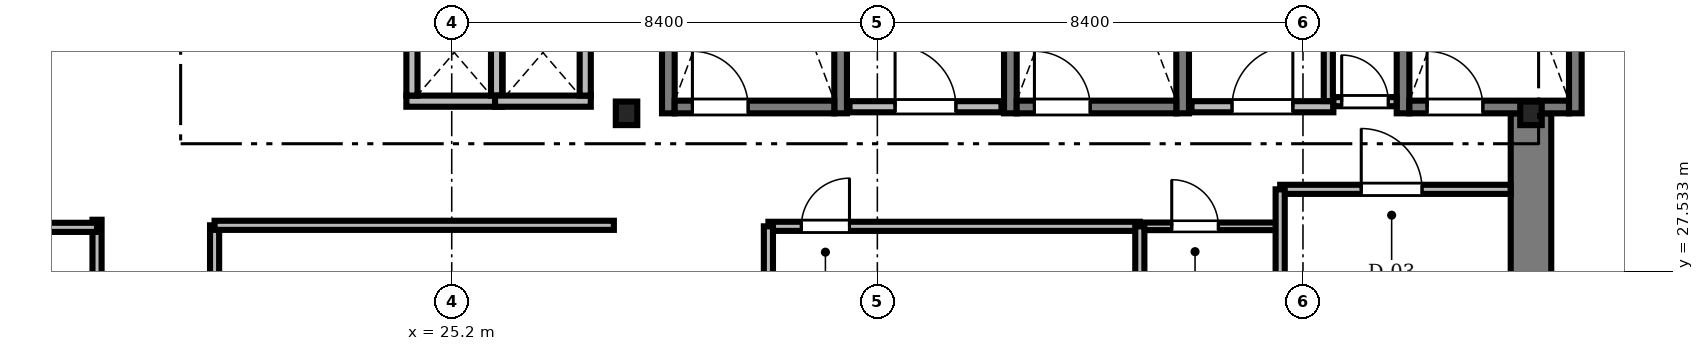
"""IFC4 building model, lengths in metres.
Left out: names, types, materials, properties, quantities, classifications, styles, units other than length and angle.
Written with IfcOpenShell. Run it as: python <this file> out.ifc"""

import sys

from ifc_helpers import new_model, si_unit, direction, frame, frame_2d, origin, origin_2d, place, context, subcontext, project, spatial, rectangle, i_section, extrude, source, transform, mapped, element, fill, save


model = new_model("IFC4")
c1 = context("Model", 3, precision=1e-05, world=origin(), true_north=direction((0.0, 1.0)))
c2 = subcontext(c1, "Body", "Model", "MODEL_VIEW")
j1 = project(units=[si_unit("LENGTHUNIT", "METRE"), si_unit("PLANEANGLEUNIT", "RADIAN")], contexts=[c1])
p1 = place(None, origin())
s1 = spatial("IfcSite", under=j1, at=p1, CompositionType="ELEMENT")
p2 = place(p1, origin())
s2 = spatial("IfcBuilding", under=s1, at=p2, CompositionType="ELEMENT")
p3 = place(p2, frame((0.0, 0.0, 107.5)))
s3 = spatial("IfcBuildingStorey", under=s2, at=p3, CompositionType="ELEMENT", Elevation=107.5)
m1 = source(origin(), c2, "Body", "SweptSolid", [
    extrude(rectangle(XDim=13.15, YDim=0.8, at=frame_2d((6.575, 0.0))), origin(), (0.0, 0.0, 1.0), 3.56),
])
p4 = place(p3, frame((46.5, 17.5, 0.0), z_axis=(0.0, 0.0, 1.0), x_axis=(0.0, 1.0, 0.0)))
e1 = element("IfcWall", 1, at=p4, inside=s3, PredefinedType="SHEAR", context=c2, shape_type="MappedRepresentation", body=[
    mapped(m1, transform((0.0, 0.0, 0.0), scale=1.0)),
])
m2 = source(origin(), c2, "Body", "SweptSolid", [
    extrude(i_section(OverallWidth=0.424, OverallDepth=0.465, WebThickness=0.035, FlangeThickness=0.056, FilletRadius=0.015, at=origin_2d()), origin(), (0.0, 0.0, 1.0), 3.56),
])
for number, where, z_axis, x_axis in (
    (2, (28.65, 30.65, 0.0), (0.0, 0.0, 1.0), (1.0, 0.0, 0.0)),
    (3, (46.5, 30.65, 0.0), (0.0, 0.0, 1.0), (1.0, 0.0, 0.0)),
):
    element("IfcColumn", number, at=place(p3, frame(where, z_axis=z_axis, x_axis=x_axis)), inside=s3, PredefinedType="COLUMN", context=c2, shape_type="MappedRepresentation", body=[
        mapped(m2, transform((0.0, 0.0, 0.0), scale=1.0)),
    ])
m3 = source(origin(), c2, "Body", "SweptSolid", [
    extrude(rectangle(XDim=9.25, YDim=0.25, at=frame_2d((4.625, 0.0))), origin(), (0.0, 0.0, 1.0), 3.6),
])
for number, where, z_axis, x_axis in (
    (4, (29.475, 30.65, 0.0), (0.0, 0.0, 1.0), (0.0, 1.0, 0.0)),
    (5, (32.875, 30.65, 0.0), (0.0, 0.0, 1.0), (0.0, 1.0, 0.0)),
):
    element("IfcWall", number, at=place(p3, frame(where, z_axis=z_axis, x_axis=x_axis)), inside=s3, PredefinedType="SOLIDWALL", context=c2, shape_type="MappedRepresentation", body=[
        mapped(m3, transform((0.0, 0.0, 0.0), scale=1.0)),
    ])
m4 = source(origin(), c2, "Body", "SweptSolid", [
    extrude(rectangle(XDim=3.15, YDim=0.25, at=frame_2d((1.575, 0.0))), origin(), (0.0, 0.0, 1.0), 3.6),
])
p5 = place(p3, frame((29.6, 30.775, 0.0), z_axis=(0.0, 0.0, 1.0), x_axis=(1.0, 0.0, 0.0)))
e6 = element("IfcWall", 6, at=p5, inside=s3, PredefinedType="SOLIDWALL", context=c2, shape_type="MappedRepresentation", body=[
    mapped(m4, transform((0.0, 0.0, 0.0), scale=1.0)),
])
m5 = source(origin(), c2, "Body", "SweptSolid", [
    extrude(rectangle(XDim=1.1, YDim=2.2, at=frame_2d((0.55, 1.1))), frame((0.0, 0.135, 0.0), z_axis=(0.0, -1.0, 0.0), x_axis=(1.0, 0.0, 0.0)), (0.0, 0.0, 1.0), 0.27),
])
p6 = place(p5, frame((0.35, 0.0, 0.0)))
e7 = element("IfcOpeningElement", 7, at=p6, cuts=e6, PredefinedType="OPENING", context=c2, shape_type="MappedRepresentation", body=[
    mapped(m5, transform((0.0, 0.0, 0.0), scale=1.0)),
])
for number, where, z_axis, x_axis in (
    (8, (36.225, 30.65, 0.0), (0.0, 0.0, 1.0), (0.0, 1.0, 0.0)),
    (9, (39.625, 30.65, 0.0), (0.0, 0.0, 1.0), (0.0, 1.0, 0.0)),
):
    element("IfcWall", number, at=place(p3, frame(where, z_axis=z_axis, x_axis=x_axis)), inside=s3, PredefinedType="SOLIDWALL", context=c2, shape_type="MappedRepresentation", body=[
        mapped(m3, transform((0.0, 0.0, 0.0), scale=1.0)),
    ])
p7 = place(p3, frame((36.35, 30.775, 0.0), z_axis=(0.0, 0.0, 1.0), x_axis=(1.0, 0.0, 0.0)))
e10 = element("IfcWall", 10, at=p7, inside=s3, PredefinedType="SOLIDWALL", context=c2, shape_type="MappedRepresentation", body=[
    mapped(m4, transform((0.0, 0.0, 0.0), scale=1.0)),
])
p8 = place(p7, frame((0.35, 0.0, 0.0)))
e11 = element("IfcOpeningElement", 11, at=p8, cuts=e10, PredefinedType="OPENING", context=c2, shape_type="MappedRepresentation", body=[
    mapped(m5, transform((0.0, 0.0, 0.0), scale=1.0)),
])
for number, where, z_axis, x_axis in (
    (12, (43.975, 30.65, 0.0), (0.0, 0.0, 1.0), (0.0, 1.0, 0.0)),
    (13, (47.375, 30.65, 0.0), (0.0, 0.0, 1.0), (0.0, 1.0, 0.0)),
):
    element("IfcWall", number, at=place(p3, frame(where, z_axis=z_axis, x_axis=x_axis)), inside=s3, PredefinedType="SOLIDWALL", context=c2, shape_type="MappedRepresentation", body=[
        mapped(m3, transform((0.0, 0.0, 0.0), scale=1.0)),
    ])
p9 = place(p3, frame((44.1, 30.775, 0.0), z_axis=(0.0, 0.0, 1.0), x_axis=(1.0, 0.0, 0.0)))
e14 = element("IfcWall", 14, at=p9, inside=s3, PredefinedType="SOLIDWALL", context=c2, shape_type="MappedRepresentation", body=[
    mapped(m4, transform((0.0, 0.0, 0.0), scale=1.0)),
])
p10 = place(p9, frame((0.35, 0.0, 0.0)))
e15 = element("IfcOpeningElement", 15, at=p10, cuts=e14, PredefinedType="OPENING", context=c2, shape_type="MappedRepresentation", body=[
    mapped(m5, transform((0.0, 0.0, 0.0), scale=1.0)),
])
m6 = source(origin(), c2, "Body", "SweptSolid", [
    extrude(rectangle(XDim=3.0, YDim=0.22, at=frame_2d((1.5, 0.0))), origin(), (0.0, 0.0, 1.0), 3.56),
])
p11 = place(p3, frame((33.05, 30.78, 0.0), z_axis=(0.0, 0.0, 1.0), x_axis=(1.0, 0.0, 0.0)))
e16 = element("IfcWall", 16, at=p11, inside=s3, PredefinedType="SOLIDWALL", context=c2, shape_type="MappedRepresentation", body=[
    mapped(m6, transform((0.0, 0.0, 0.0), scale=1.0)),
])
m7 = source(origin(), c2, "Body", "SweptSolid", [
    extrude(rectangle(XDim=1.2, YDim=2.2, at=frame_2d((0.6, 1.1))), frame((0.0, 0.12, 0.0), z_axis=(0.0, -1.0, 0.0), x_axis=(1.0, 0.0, 0.0)), (0.0, 0.0, 1.0), 0.24),
])
p12 = place(p11, frame((0.9, 0.0, 0.0)))
e17 = element("IfcOpeningElement", 17, at=p12, cuts=e16, PredefinedType="OPENING", context=c2, shape_type="MappedRepresentation", body=[
    mapped(m7, transform((0.0, 0.0, 0.0), scale=1.0)),
])
m8 = source(origin(), c2, "Body", "SweptSolid", [
    extrude(rectangle(XDim=2.8, YDim=0.22, at=frame_2d((1.4, 0.0))), origin(), (0.0, 0.0, 1.0), 3.56),
])
p13 = place(p3, frame((39.8, 30.78, 0.0), z_axis=(0.0, 0.0, 1.0), x_axis=(1.0, 0.0, 0.0)))
e18 = element("IfcWall", 18, at=p13, inside=s3, PredefinedType="SOLIDWALL", context=c2, shape_type="MappedRepresentation", body=[
    mapped(m8, transform((0.0, 0.0, 0.0), scale=1.0)),
])
p14 = place(p13, frame((0.8, 0.0, 0.0)))
e19 = element("IfcOpeningElement", 19, at=p14, cuts=e18, PredefinedType="OPENING", context=c2, shape_type="MappedRepresentation", body=[
    mapped(m7, transform((0.0, 0.0, 0.0), scale=1.0)),
])
m9 = source(origin(), c2, "Body", "SweptSolid", [
    extrude(rectangle(XDim=1.89, YDim=0.22, at=frame_2d((0.945, 0.0))), origin(), (0.0, 0.0, 1.0), 3.56),
])
p15 = place(p3, frame((24.305, 30.89, 0.0), z_axis=(0.0, 0.0, 1.0), x_axis=(1.0, 0.0, 0.0)))
e20 = element("IfcWall", 20, at=p15, inside=s3, PredefinedType="SOLIDWALL", context=c2, shape_type="MappedRepresentation", body=[
    mapped(m9, transform((0.0, 0.0, 0.0), scale=1.0)),
])
m10 = source(origin(), c2, "Body", "SweptSolid", [
    extrude(rectangle(XDim=1.7, YDim=0.22, at=frame_2d((0.85, 0.0))), origin(), (0.0, 0.0, 1.0), 3.56),
])
for number, where, z_axis, x_axis in (
    (21, (24.415, 31.0, 0.0), (0.0, 0.0, 1.0), (0.0, 1.0, 0.0)),
    (22, (26.085, 31.0, 0.0), (0.0, 0.0, 1.0), (0.0, 1.0, 0.0)),
):
    element("IfcWall", number, at=place(p3, frame(where, z_axis=z_axis, x_axis=x_axis)), inside=s3, PredefinedType="SOLIDWALL", context=c2, shape_type="MappedRepresentation", body=[
        mapped(m10, transform((0.0, 0.0, 0.0), scale=1.0)),
    ])
p16 = place(p3, frame((26.055, 30.89, 0.0), z_axis=(0.0, 0.0, 1.0), x_axis=(1.0, 0.0, 0.0)))
e23 = element("IfcWall", 23, at=p16, inside=s3, PredefinedType="SOLIDWALL", context=c2, shape_type="MappedRepresentation", body=[
    mapped(m9, transform((0.0, 0.0, 0.0), scale=1.0)),
])
p17 = place(p3, frame((27.835, 31.0, 0.0), z_axis=(0.0, 0.0, 1.0), x_axis=(0.0, 1.0, 0.0)))
e24 = element("IfcWall", 24, at=p17, inside=s3, PredefinedType="SOLIDWALL", context=c2, shape_type="MappedRepresentation", body=[
    mapped(m10, transform((0.0, 0.0, 0.0), scale=1.0)),
])
m11 = source(origin(), c2, "Body", "SweptSolid", [
    extrude(rectangle(XDim=11.94, YDim=0.18, at=frame_2d((5.97, 0.0))), origin(), (0.0, 0.0, 1.0), 2.952),
])
p18 = place(p3, frame((20.52, 16.5, 0.0), z_axis=(0.0, 0.0, 1.0), x_axis=(0.0, 1.0, 0.0)))
e25 = element("IfcWall", 25, at=p18, inside=s3, PredefinedType="PARTITIONING", context=c2, shape_type="MappedRepresentation", body=[
    mapped(m11, transform((0.0, 0.0, 0.0), scale=1.0)),
])
m12 = source(origin(), c2, "Body", "SweptSolid", [
    extrude(rectangle(XDim=1.05, YDim=2.2, at=frame_2d((0.525, 1.1))), frame((0.0, 0.1, 0.0), z_axis=(0.0, -1.0, 0.0), x_axis=(1.0, 0.0, 0.0)), (0.0, 0.0, 1.0), 0.2),
])
p19 = place(p18, frame((4.5, 0.0, 0.0)))
e26 = element("IfcOpeningElement", 26, at=p19, cuts=e25, PredefinedType="OPENING", context=c2, shape_type="MappedRepresentation", body=[
    mapped(m12, transform((0.0, 0.0, 0.0), scale=1.0)),
])
m13 = source(origin(), c2, "Body", "SweptSolid", [
    extrude(rectangle(XDim=7.33, YDim=0.18, at=frame_2d((3.665, 0.0))), origin(), (0.0, 0.0, 1.0), 3.192),
])
p20 = place(p3, frame((31.45, 28.42, 0.0), z_axis=(0.0, 0.0, 1.0), x_axis=(1.0, 0.0, 0.0)))
e27 = element("IfcWall", 27, at=p20, inside=s3, PredefinedType="PARTITIONING", context=c2, shape_type="MappedRepresentation", body=[
    mapped(m13, transform((0.0, 0.0, 0.0), scale=1.0)),
])
m14 = source(origin(), c2, "Body", "SweptSolid", [
    extrude(rectangle(XDim=0.95, YDim=2.15, at=frame_2d((0.475, 1.075))), frame((0.0, 0.1, 0.0), z_axis=(0.0, -1.0, 0.0), x_axis=(1.0, 0.0, 0.0)), (0.0, 0.0, 1.0), 0.2),
])
p21 = place(p20, frame((0.65, 0.0, 0.0)))
e28 = element("IfcOpeningElement", 28, at=p21, cuts=e27, PredefinedType="OPENING", context=c2, shape_type="MappedRepresentation", body=[
    mapped(m14, transform((0.0, 0.0, 0.0), scale=1.0)),
])
m15 = source(origin(), c2, "Body", "SweptSolid", [
    extrude(rectangle(XDim=4.548, YDim=0.18, at=frame_2d((2.274, 0.0))), origin(), (0.0, 0.0, 1.0), 3.192),
])
p22 = place(p3, frame((41.55, 29.15, 0.0), z_axis=(0.0, 0.0, 1.0), x_axis=(1.0, 0.0, 0.0)))
e29 = element("IfcWall", 29, at=p22, inside=s3, PredefinedType="PARTITIONING", context=c2, shape_type="MappedRepresentation", body=[
    mapped(m15, transform((0.0, 0.0, 0.0), scale=1.0)),
])
m16 = source(origin(), c2, "Body", "SweptSolid", [
    extrude(rectangle(XDim=1.2, YDim=2.2, at=frame_2d((0.6, 1.1))), frame((0.0, 0.1, 0.0), z_axis=(0.0, -1.0, 0.0), x_axis=(1.0, 0.0, 0.0)), (0.0, 0.0, 1.0), 0.2),
])
p23 = place(p22, frame((1.6, 0.0, 0.0)))
e30 = element("IfcOpeningElement", 30, at=p23, cuts=e29, PredefinedType="OPENING", context=c2, shape_type="MappedRepresentation", body=[
    mapped(m16, transform((0.0, 0.0, 0.0), scale=1.0)),
])
m17 = source(origin(), c2, "Body", "SweptSolid", [
    extrude(rectangle(XDim=2.74, YDim=0.15, at=frame_2d((1.37, 0.0))), origin(), (0.0, 0.0, 1.0), 3.56),
])
p24 = place(p3, frame((38.78, 28.42, 0.0), z_axis=(0.0, 0.0, 1.0), x_axis=(1.0, 0.0, 0.0)))
e31 = element("IfcWall", 31, at=p24, inside=s3, PredefinedType="PARTITIONING", context=c2, shape_type="MappedRepresentation", body=[
    mapped(m17, transform((0.0, 0.0, 0.0), scale=1.0)),
])
m18 = source(origin(), c2, "Body", "SweptSolid", [
    extrude(rectangle(XDim=0.92, YDim=2.1, at=frame_2d((0.46, 1.05))), frame((0.0, 0.085, 0.0), z_axis=(0.0, -1.0, 0.0), x_axis=(1.0, 0.0, 0.0)), (0.0, 0.0, 1.0), 0.17),
])
p25 = place(p24, frame((0.63, 0.0, 0.0)))
e32 = element("IfcOpeningElement", 32, at=p25, cuts=e31, PredefinedType="OPENING", context=c2, shape_type="MappedRepresentation", body=[
    mapped(m18, transform((0.0, 0.0, 0.0), scale=1.0)),
])
m19 = source(origin(), c2, "Body", "SweptSolid", [
    extrude(rectangle(XDim=1.248, YDim=0.18, at=frame_2d((0.624, 0.0))), origin(), (0.0, 0.0, 1.0), 3.56),
])
p26 = place(p3, frame((42.6, 30.88, 0.0), z_axis=(0.0, 0.0, 1.0), x_axis=(1.0, 0.0, 0.0)))
e33 = element("IfcWall", 33, at=p26, inside=s3, PredefinedType="PARTITIONING", context=c2, shape_type="MappedRepresentation", body=[
    mapped(m19, transform((0.0, 0.0, 0.0), scale=1.0)),
])
m20 = source(origin(), c2, "Body", "SweptSolid", [
    extrude(rectangle(XDim=0.92, YDim=2.1, at=frame_2d((0.46, 1.05))), frame((0.0, 0.1, 0.0), z_axis=(0.0, -1.0, 0.0), x_axis=(1.0, 0.0, 0.0)), (0.0, 0.0, 1.0), 0.2),
])
p27 = place(p26, frame((0.164, 0.0, 0.0)))
e34 = element("IfcOpeningElement", 34, at=p27, cuts=e33, PredefinedType="OPENING", context=c2, shape_type="MappedRepresentation", body=[
    mapped(m20, transform((0.0, 0.0, 0.0), scale=1.0)),
])
m21 = source(origin(), c2, "Body", "SweptSolid", [
    extrude(rectangle(XDim=14.0, YDim=0.18, at=frame_2d((7.0, 0.0))), origin(), (0.0, 0.0, 1.0), 2.952),
])
p28 = place(p3, frame((18.2, 14.55, 0.0), z_axis=(0.0, 0.0, 1.0), x_axis=(0.0, 1.0, 0.0)))
e35 = element("IfcWall", 35, at=p28, inside=s3, PredefinedType="PARTITIONING", context=c2, shape_type="MappedRepresentation", body=[
    mapped(m21, transform((0.0, 0.0, 0.0), scale=1.0)),
])
m22 = source(origin(), c2, "Body", "SweptSolid", [
    extrude(rectangle(XDim=11.47, YDim=0.18, at=frame_2d((5.735, 0.0))), origin(), (0.0, 0.0, 1.0), 2.802),
])
p29 = place(p3, frame((6.73, 28.4, 0.0), z_axis=(0.0, 0.0, 1.0), x_axis=(1.0, 0.0, 0.0)))
e36 = element("IfcWall", 36, at=p29, inside=s3, PredefinedType="PARTITIONING", context=c2, shape_type="MappedRepresentation", body=[
    mapped(m22, transform((0.0, 0.0, 0.0), scale=1.0)),
])
m23 = source(origin(), c2, "Body", "SweptSolid", [
    extrude(rectangle(XDim=7.88, YDim=0.18, at=frame_2d((3.94, 0.0))), origin(), (0.0, 0.0, 1.0), 3.56),
])
p30 = place(p3, frame((20.52, 28.44, 0.0), z_axis=(0.0, 0.0, 1.0), x_axis=(1.0, 0.0, 0.0)))
e37 = element("IfcWall", 37, at=p30, inside=s3, PredefinedType="PARTITIONING", context=c2, shape_type="MappedRepresentation", body=[
    mapped(m23, transform((0.0, 0.0, 0.0), scale=1.0)),
])
m24 = source(origin(), c2, "Body", "SweptSolid", [
    extrude(rectangle(XDim=2.758, YDim=0.18, at=frame_2d((1.379, 0.0))), origin(), (0.0, 0.0, 1.0), 3.56),
])
p31 = place(p3, frame((42.5, 30.892, 0.0), z_axis=(0.0, 0.0, 1.0), x_axis=(0.0, 1.0, 0.0)))
e38 = element("IfcWall", 38, at=p31, inside=s3, PredefinedType="PARTITIONING", context=c2, shape_type="MappedRepresentation", body=[
    mapped(m24, transform((0.0, 0.0, 0.0), scale=1.0)),
])
m25 = source(origin(), c2, "Body", "SweptSolid", [
    extrude(rectangle(XDim=2.35, YDim=0.18, at=frame_2d((1.175, 0.0))), origin(), (0.0, 0.0, 1.0), 2.952),
])
p32 = place(p3, frame((41.55, 26.8, 0.0), z_axis=(0.0, 0.0, 1.0), x_axis=(0.0, 1.0, 0.0)))
e39 = element("IfcWall", 39, at=p32, inside=s3, PredefinedType="PARTITIONING", context=c2, shape_type="MappedRepresentation", body=[
    mapped(m25, transform((0.0, 0.0, 0.0), scale=1.0)),
])
m26 = source(origin(), c2, "Body", "SweptSolid", [
    extrude(rectangle(XDim=1.6, YDim=0.18, at=frame_2d((0.8, 0.0))), origin(), (0.0, 0.0, 1.0), 3.102),
])
for number, where, z_axis, x_axis in (
    (40, (31.45, 26.82, 0.0), (0.0, 0.0, 1.0), (0.0, 1.0, 0.0)),
    (41, (38.78, 26.82, 0.0), (0.0, 0.0, 1.0), (0.0, 1.0, 0.0)),
):
    element("IfcWall", number, at=place(p3, frame(where, z_axis=z_axis, x_axis=x_axis)), inside=s3, PredefinedType="PARTITIONING", context=c2, shape_type="MappedRepresentation", body=[
        mapped(m26, transform((0.0, 0.0, 0.0), scale=1.0)),
    ])
m27 = source(origin(), c2, "Body", "SweptSolid", [
    extrude(rectangle(XDim=1.1, YDim=2.2, at=frame_2d((0.55, 1.1))), frame((0.0, 0.025, 0.0), z_axis=(0.0, -1.0, 0.0), x_axis=(1.0, 0.0, 0.0)), (0.0, 0.0, 1.0), 0.05),
])
p33 = place(p6, origin())
e42 = element("IfcDoor", 42, at=p33, inside=s3, OperationType="SINGLE_SWING_LEFT", PredefinedType="DOOR", context=c2, shape_type="MappedRepresentation", body=[
    mapped(m27, transform((0.0, 0.0, 0.0), scale=1.0)),
])
fill(e7, e42)
p34 = place(p8, origin())
e43 = element("IfcDoor", 43, at=p34, inside=s3, OperationType="SINGLE_SWING_LEFT", PredefinedType="DOOR", context=c2, shape_type="MappedRepresentation", body=[
    mapped(m27, transform((0.0, 0.0, 0.0), scale=1.0)),
])
fill(e11, e43)
p35 = place(p10, origin())
e44 = element("IfcDoor", 44, at=p35, inside=s3, OperationType="SINGLE_SWING_LEFT", PredefinedType="DOOR", context=c2, shape_type="MappedRepresentation", body=[
    mapped(m27, transform((0.0, 0.0, 0.0), scale=1.0)),
])
fill(e15, e44)
m28 = source(origin(), c2, "Body", "SweptSolid", [
    extrude(rectangle(XDim=1.2, YDim=2.2, at=frame_2d((0.6, 1.1))), frame((0.0, 0.025, 0.0), z_axis=(0.0, -1.0, 0.0), x_axis=(1.0, 0.0, 0.0)), (0.0, 0.0, 1.0), 0.05),
])
p36 = place(p12, origin())
e45 = element("IfcDoor", 45, at=p36, inside=s3, OperationType="SINGLE_SWING_LEFT", PredefinedType="DOOR", context=c2, shape_type="MappedRepresentation", body=[
    mapped(m28, transform((0.0, 0.0, 0.0), scale=1.0)),
])
fill(e17, e45)
p37 = place(p14, origin())
e46 = element("IfcDoor", 46, at=p37, inside=s3, OperationType="SINGLE_SWING_RIGHT", PredefinedType="DOOR", context=c2, shape_type="MappedRepresentation", body=[
    mapped(m28, transform((0.0, 0.0, 0.0), scale=1.0)),
])
fill(e19, e46)
m29 = source(origin(), c2, "Body", "SweptSolid", [
    extrude(rectangle(XDim=0.95, YDim=2.15, at=frame_2d((0.475, 1.075))), frame((0.0, 0.025, 0.0), z_axis=(0.0, -1.0, 0.0), x_axis=(1.0, 0.0, 0.0)), (0.0, 0.0, 1.0), 0.05),
])
p38 = place(p21, origin())
e47 = element("IfcDoor", 47, at=p38, inside=s3, OperationType="SINGLE_SWING_RIGHT", PredefinedType="DOOR", context=c2, shape_type="MappedRepresentation", body=[
    mapped(m29, transform((0.0, 0.0, 0.0), scale=1.0)),
])
fill(e28, e47)
p39 = place(p23, origin())
e48 = element("IfcDoor", 48, at=p39, inside=s3, OperationType="SINGLE_SWING_LEFT", PredefinedType="DOOR", context=c2, shape_type="MappedRepresentation", body=[
    mapped(m28, transform((0.0, 0.0, 0.0), scale=1.0)),
])
fill(e30, e48)
m30 = source(origin(), c2, "Body", "SweptSolid", [
    extrude(rectangle(XDim=0.92, YDim=2.1, at=frame_2d((0.46, 1.05))), frame((0.0, 0.025, 0.0), z_axis=(0.0, -1.0, 0.0), x_axis=(1.0, 0.0, 0.0)), (0.0, 0.0, 1.0), 0.05),
])
p40 = place(p25, origin())
e49 = element("IfcDoor", 49, at=p40, inside=s3, OperationType="SINGLE_SWING_LEFT", PredefinedType="DOOR", context=c2, shape_type="MappedRepresentation", body=[
    mapped(m30, transform((0.0, 0.0, 0.0), scale=1.0)),
])
fill(e32, e49)
p41 = place(p27, origin())
e50 = element("IfcDoor", 50, at=p41, inside=s3, OperationType="SINGLE_SWING_LEFT", PredefinedType="DOOR", context=c2, shape_type="MappedRepresentation", body=[
    mapped(m30, transform((0.0, 0.0, 0.0), scale=1.0)),
])
fill(e34, e50)
save(model, sys.argv[1])
